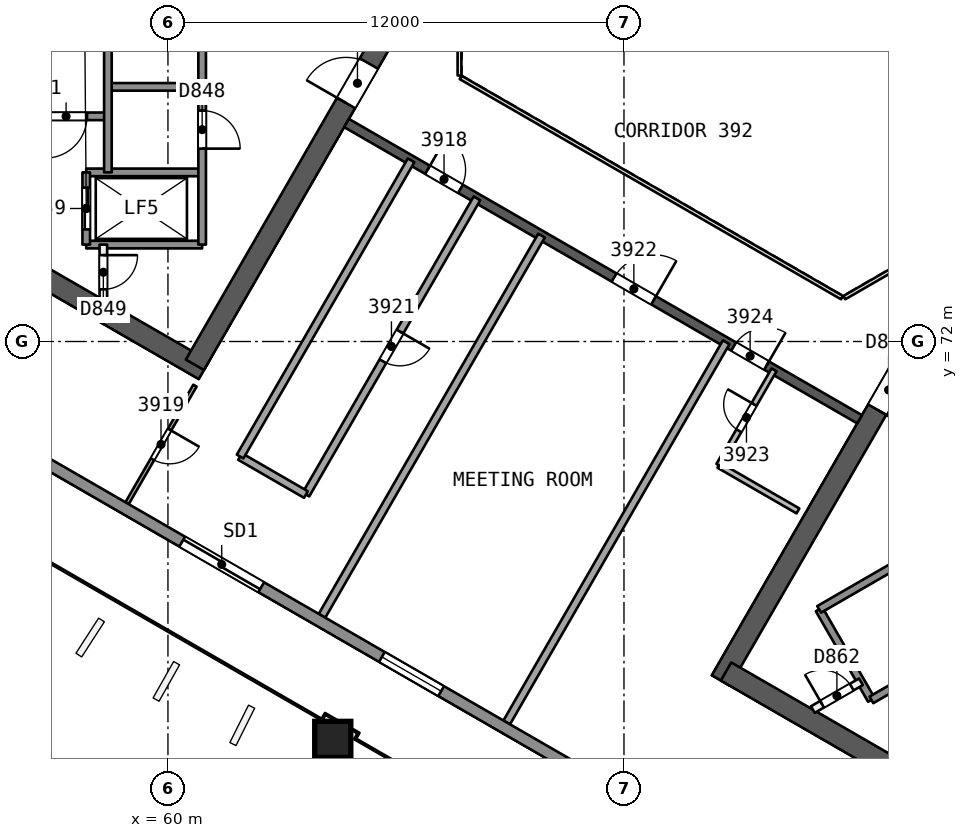
"""IFC4 building model, lengths in metres.
Left out: names, types, materials, properties, quantities, classifications, styles, units other than length and angle.
Written with IfcOpenShell. Run it as: python <this file> out.ifc"""

import sys

from ifc_helpers import new_model, si_unit, direction, frame, frame_2d, origin, origin_2d, place, context, subcontext, project, spatial, rectangle, extrude, element, fill, save


model = new_model("IFC4")
c1 = context("Model", 3, precision=1e-05, world=origin(), true_north=direction((0.0, 1.0)))
c2 = subcontext(c1, "Body", "Model", "MODEL_VIEW")
j1 = project(units=[si_unit("LENGTHUNIT", "METRE"), si_unit("PLANEANGLEUNIT", "RADIAN")], contexts=[c1])
p1 = place(None, origin())
s1 = spatial("IfcSite", under=j1, at=p1, CompositionType="ELEMENT")
p2 = place(p1, origin())
s2 = spatial("IfcBuilding", under=s1, at=p2, CompositionType="ELEMENT")
p3 = place(p2, frame((0.0, 0.0, 163.7)))
s3 = spatial("IfcBuildingStorey", under=s2, at=p3, CompositionType="ELEMENT", Elevation=163.7)
p4 = place(p3, frame((48.672, 78.336, 0.0), z_axis=(0.0, 0.0, 1.0), x_axis=(0.866023530946, -0.500003243837, 0.0)))
e1 = element("IfcWall", 1, at=p4, inside=s3, PredefinedType="SHEAR", context=c2, shape_type="SweptSolid", body=[
    extrude(rectangle(XDim=14.175, YDim=0.55, at=frame_2d((7.087, 0.0))), origin(), (0.0, 0.0, 1.0), 3.7),
])
p5 = place(p3, frame((60.709, 71.386, 0.0), z_axis=(0.0, 0.0, 1.0), x_axis=(0.500015938302, 0.866016201606, 0.0)))
e2 = element("IfcWall", 2, at=p5, inside=s3, PredefinedType="SHEAR", context=c2, shape_type="SweptSolid", body=[
    extrude(rectangle(XDim=10.105, YDim=0.55, at=frame_2d((5.053, 0.0))), origin(), (0.0, 0.0, 1.0), 3.7),
])
p6 = place(p5, frame((7.955, 0.0, 0.0)))
e3 = element("IfcOpeningElement", 3, at=p6, cuts=e2, PredefinedType="OPENING", context=c2, shape_type="SweptSolid", body=[
    extrude(rectangle(XDim=1.2, YDim=2.1, at=frame_2d((0.6, 1.05))), frame((0.0, 0.286, 0.0), z_axis=(0.0, -1.0, 0.0), x_axis=(1.0, 0.0, 0.0)), (0.0, 0.0, 1.0), 0.571),
])
p7 = place(p3, frame((79.659, 71.931, 0.0), z_axis=(0.0, 0.0, 1.0), x_axis=(-0.500000202252, -0.866025287014, 0.0)))
e4 = element("IfcWall", 4, at=p7, inside=s3, PredefinedType="SHEAR", context=c2, shape_type="SweptSolid", body=[
    extrude(rectangle(XDim=10.221, YDim=0.55, at=frame_2d((5.111, 0.0))), origin(), (0.0, 0.0, 1.0), 3.7),
])
p8 = place(p7, frame((0.791, 0.0, 0.0)))
e5 = element("IfcOpeningElement", 5, at=p8, cuts=e4, PredefinedType="OPENING", context=c2, shape_type="SweptSolid", body=[
    extrude(rectangle(XDim=1.2, YDim=2.1, at=frame_2d((0.6, 1.05))), frame((0.0, 0.286, 0.0), z_axis=(0.0, -1.0, 0.0), x_axis=(1.0, 0.0, 0.0)), (0.0, 0.0, 1.0), 0.571),
])
p9 = place(p3, frame((74.686, 63.317, 0.0), z_axis=(0.0, 0.0, 1.0), x_axis=(0.866024505738, -0.500001555459, 0.0)))
e6 = element("IfcWall", 6, at=p9, inside=s3, PredefinedType="SHEAR", context=c2, shape_type="SweptSolid", body=[
    extrude(rectangle(XDim=14.059, YDim=0.55, at=frame_2d((7.029, 0.0))), origin(), (0.0, 0.0, 1.0), 3.7),
])
p10 = place(p3, frame((64.7, 77.748, 0.0), z_axis=(0.0, 0.0, 1.0), x_axis=(0.866026492143, -0.499998114903, 0.0)))
e7 = element("IfcWall", 7, at=p10, inside=s3, PredefinedType="SHEAR", context=c2, shape_type="SweptSolid", body=[
    extrude(rectangle(XDim=15.588, YDim=0.25, at=frame_2d((7.794, 0.0))), origin(), (0.0, 0.0, 1.0), 3.25),
])
p11 = place(p10, frame((2.462, 0.0, 0.0)))
e8 = element("IfcOpeningElement", 8, at=p11, cuts=e7, PredefinedType="OPENING", context=c2, shape_type="SweptSolid", body=[
    extrude(rectangle(XDim=1.0, YDim=2.1, at=frame_2d((0.5, 1.05))), frame((0.0, 0.135, 0.0), z_axis=(0.0, -1.0, 0.0), x_axis=(1.0, 0.0, 0.0)), (0.0, 0.0, 1.0), 0.271),
])
p12 = place(p10, frame((8.129, 0.0, 0.0)))
e9 = element("IfcOpeningElement", 9, at=p12, cuts=e7, PredefinedType="OPENING", context=c2, shape_type="SweptSolid", body=[
    extrude(rectangle(XDim=1.2, YDim=2.4, at=frame_2d((0.6, 1.2))), frame((0.0, 0.135, 0.0), z_axis=(0.0, -1.0, 0.0), x_axis=(1.0, 0.0, 0.0)), (0.0, 0.0, 1.0), 0.271),
])
p13 = place(p10, frame((11.762, 0.0, 0.0)))
e10 = element("IfcOpeningElement", 10, at=p13, cuts=e7, PredefinedType="OPENING", context=c2, shape_type="SweptSolid", body=[
    extrude(rectangle(XDim=1.0, YDim=2.1, at=frame_2d((0.5, 1.05))), frame((0.0, 0.135, 0.0), z_axis=(0.0, -1.0, 0.0), x_axis=(1.0, 0.0, 0.0)), (0.0, 0.0, 1.0), 0.271),
])
p14 = place(p3, frame((64.325, 61.51, 0.0), z_axis=(0.010093620709, 0.017482414954, 0.999796221231), x_axis=(-0.499907122366, -0.865843723195, 0.020187025824)))
e11 = element("IfcColumn", 11, at=p14, inside=s3, PredefinedType="COLUMN", context=c2, shape_type="SweptSolid", body=[
    extrude(rectangle(XDim=0.95, YDim=0.95, at=origin_2d()), origin(), (0.0, 0.0, 1.0), 3.701),
])
p15 = place(p3, frame((60.71, 70.838, 0.0), z_axis=(0.0, 0.0, 1.0), x_axis=(-0.4999827131, -0.866035384151, 0.0)))
e12 = element("IfcWall", 12, at=p15, inside=s3, PredefinedType="PARTITIONING", context=c2, shape_type="SweptSolid", body=[
    extrude(rectangle(XDim=3.573, YDim=0.1, at=frame_2d((1.787, 0.0))), origin(), (0.0, 0.0, 1.0), 3.25),
])
p16 = place(p15, frame((1.336, 0.0, 0.0)))
e13 = element("IfcOpeningElement", 13, at=p16, cuts=e12, PredefinedType="OPENING", context=c2, shape_type="SweptSolid", body=[
    extrude(rectangle(XDim=0.9, YDim=2.1, at=frame_2d((0.45, 1.05))), frame((0.0, 0.061, 0.0), z_axis=(0.0, -1.0, 0.0), x_axis=(1.0, 0.0, 0.0)), (0.0, 0.0, 1.0), 0.121),
])
p17 = place(p3, frame((68.131, 75.767, 0.0), z_axis=(0.0, 0.0, 1.0), x_axis=(-0.5000018851, -0.866024315419, 0.0)))
e14 = element("IfcWall", 14, at=p17, inside=s3, PredefinedType="PARTITIONING", context=c2, shape_type="SweptSolid", body=[
    extrude(rectangle(XDim=9.0, YDim=0.2, at=frame_2d((4.5, 0.0))), origin(), (0.0, 0.0, 1.0), 3.25),
])
p18 = place(p17, frame((4.05, 0.0, 0.0)))
e15 = element("IfcOpeningElement", 15, at=p18, cuts=e14, PredefinedType="OPENING", context=c2, shape_type="SweptSolid", body=[
    extrude(rectangle(XDim=0.9, YDim=2.1, at=frame_2d((0.45, 1.05))), frame((0.0, 0.11, 0.0), z_axis=(0.0, -1.0, 0.0), x_axis=(1.0, 0.0, 0.0)), (0.0, 0.0, 1.0), 0.221),
])
p19 = place(p3, frame((63.631, 67.973, 0.0), z_axis=(0.0, 0.0, 1.0), x_axis=(-0.866041268327, 0.499972520799, 0.0)))
e16 = element("IfcWall", 16, at=p19, inside=s3, PredefinedType="PARTITIONING", context=c2, shape_type="SweptSolid", body=[
    extrude(rectangle(XDim=2.0, YDim=0.2, at=frame_2d((1.0, 0.0))), origin(), (0.0, 0.0, 1.0), 3.25),
])
p20 = place(p3, frame((61.899, 68.973, 0.0), z_axis=(0.0, 0.0, 1.0), x_axis=(0.5000018851, 0.866024315419, 0.0)))
e17 = element("IfcWall", 17, at=p20, inside=s3, PredefinedType="PARTITIONING", context=c2, shape_type="SweptSolid", body=[
    extrude(rectangle(XDim=9.0, YDim=0.2, at=frame_2d((4.5, 0.0))), origin(), (0.0, 0.0, 1.0), 3.25),
])
for number, where, z_axis, x_axis in (
    (18, (64.054, 64.782, 0.0), (0.0, 0.0, 1.0), (0.5, 0.866, 0.0)),
    (19, (68.914, 61.977, 0.0), (0.0, 0.0, 1.0), (0.5, 0.866, 0.0)),
):
    element("IfcWall", number, at=place(p3, frame(where, z_axis=z_axis, x_axis=x_axis)), inside=s3, PredefinedType="PARTITIONING", context=c2, shape_type="SweptSolid", body=[
        extrude(rectangle(XDim=11.552, YDim=0.2, at=frame_2d((5.776, 0.0))), origin(), (0.0, 0.0, 1.0), 3.25),
    ])
p21 = place(p3, frame((76.578, 67.542, 0.0), z_axis=(0.0, 0.0, 1.0), x_axis=(-0.866038271014, 0.499977712642, 0.0)))
e20 = element("IfcWall", 20, at=p21, inside=s3, PredefinedType="PARTITIONING", context=c2, shape_type="SweptSolid", body=[
    extrude(rectangle(XDim=2.401, YDim=0.15, at=frame_2d((1.2, 0.0))), origin(), (0.0, 0.0, 1.0), 3.25),
])
p22 = place(p3, frame((74.498, 68.743, 0.0), z_axis=(0.0, 0.0, 1.0), x_axis=(0.499987231761, 0.866032775405, 0.0)))
e21 = element("IfcWall", 21, at=p22, inside=s3, PredefinedType="PARTITIONING", context=c2, shape_type="SweptSolid", body=[
    extrude(rectangle(XDim=2.9, YDim=0.15, at=frame_2d((1.45, 0.0))), origin(), (0.0, 0.0, 1.0), 3.25),
])
p23 = place(p22, frame((1.05, 0.0, 0.0)))
e22 = element("IfcOpeningElement", 22, at=p23, cuts=e21, PredefinedType="OPENING", context=c2, shape_type="SweptSolid", body=[
    extrude(rectangle(XDim=0.8, YDim=2.1, at=frame_2d((0.4, 1.05))), frame((0.0, 0.085, 0.0), z_axis=(0.0, -1.0, 0.0), x_axis=(1.0, 0.0, 0.0)), (0.0, 0.0, 1.0), 0.171),
])
p24 = place(p3, frame((89.01, 50.202, 0.0), z_axis=(0.0, 0.0, 1.0), x_axis=(-0.866025862562, 0.499999205373, 0.0)))
e23 = element("IfcWall", 23, at=p24, inside=s3, PredefinedType="SOLIDWALL", context=c2, shape_type="SweptSolid", body=[
    extrude(rectangle(XDim=54.064, YDim=0.3, at=frame_2d((27.032, 0.0))), origin(), (0.0, 0.0, 1.0), 3.25),
])
p25 = place(p24, frame((30.665, 0.0, 0.0)))
e24 = element("IfcOpeningElement", 24, at=p25, cuts=e23, PredefinedType="OPENING", context=c2, shape_type="SweptSolid", body=[
    extrude(rectangle(XDim=2.4, YDim=2.4, at=frame_2d((1.2, 1.2))), frame((0.0, 0.161, 0.0), z_axis=(0.0, -1.0, 0.0), x_axis=(1.0, 0.0, 0.0)), (0.0, 0.0, 1.0), 0.321),
])
p26 = place(p24, frame((42.011, 0.0, 0.0)))
e25 = element("IfcOpeningElement", 25, at=p26, cuts=e23, PredefinedType="OPENING", context=c2, shape_type="SweptSolid", body=[
    extrude(rectangle(XDim=2.4, YDim=2.4, at=frame_2d((1.2, 1.2))), frame((0.0, 0.161, 0.0), z_axis=(0.0, -1.0, 0.0), x_axis=(1.0, 0.0, 0.0)), (0.0, 0.0, 1.0), 0.321),
])
p27 = place(p24, frame((10.402, 0.0, 0.0)))
e26 = element("IfcOpeningElement", 26, at=p27, cuts=e23, PredefinedType="OPENING", context=c2, shape_type="SweptSolid", body=[
    extrude(rectangle(XDim=2.4, YDim=2.4, at=frame_2d((1.2, 1.2))), frame((0.0, 0.161, 0.0), z_axis=(0.0, -1.0, 0.0), x_axis=(1.0, 0.0, 0.0)), (0.0, 0.0, 1.0), 0.321),
])
p28 = place(p24, frame((25.197, 0.0, 0.9)))
e27 = element("IfcOpeningElement", 27, at=p28, cuts=e23, PredefinedType="OPENING", context=c2, shape_type="SweptSolid", body=[
    extrude(rectangle(XDim=1.8, YDim=1.5, at=frame_2d((0.9, 0.75))), frame((0.0, 0.161, 0.0), z_axis=(0.0, -1.0, 0.0), x_axis=(1.0, 0.0, 0.0)), (0.0, 0.0, 1.0), 0.321),
])
p29 = place(p3, frame((60.9, 78.7, 0.0), z_axis=(0.0, 0.0, 1.0), x_axis=(-1.0, 0.0, 0.0)))
e28 = element("IfcWall", 28, at=p29, inside=s3, PredefinedType="SOLIDWALL", context=c2, shape_type="SweptSolid", body=[
    extrude(rectangle(XDim=2.48, YDim=0.2, at=frame_2d((1.24, 0.0))), origin(), (0.0, 0.0, 1.0), 3.25),
])
p30 = place(p3, frame((58.42, 77.925, 0.0), z_axis=(0.0, 0.0, 1.0), x_axis=(-1.0, 0.0, 0.0)))
e29 = element("IfcWall", 29, at=p30, inside=s3, PredefinedType="SOLIDWALL", context=c2, shape_type="SweptSolid", body=[
    extrude(rectangle(XDim=7.7, YDim=0.2, at=frame_2d((3.85, 0.0))), origin(), (0.0, 0.0, 1.0), 3.25),
])
p31 = place(p30, frame((0.55, 0.0, 0.0)))
e30 = element("IfcOpeningElement", 30, at=p31, cuts=e29, PredefinedType="OPENING", context=c2, shape_type="SweptSolid", body=[
    extrude(rectangle(XDim=1.1, YDim=2.1, at=frame_2d((0.55, 1.05))), frame((0.0, 0.11, 0.0), z_axis=(0.0, -1.0, 0.0), x_axis=(1.0, 0.0, 0.0)), (0.0, 0.0, 1.0), 0.221),
])
for number, where, z_axis, x_axis in (
    (31, (60.9, 76.45, 0.0), (0.0, 0.0, 1.0), (-1.0, 0.0, 0.0)),
    (32, (60.9, 74.55, 0.0), (0.0, 0.0, 1.0), (-1.0, 0.0, 0.0)),
):
    element("IfcWall", number, at=place(p3, frame(where, z_axis=z_axis, x_axis=x_axis)), inside=s3, PredefinedType="SOLIDWALL", context=c2, shape_type="SweptSolid", body=[
        extrude(rectangle(XDim=3.05, YDim=0.2, at=frame_2d((1.525, 0.0))), origin(), (0.0, 0.0, 1.0), 3.25),
    ])
p32 = place(p3, frame((60.9, 85.45, 0.0), z_axis=(0.0, 0.0, 1.0), x_axis=(0.0, -1.0, 0.0)))
e33 = element("IfcWall", 33, at=p32, inside=s3, PredefinedType="SOLIDWALL", context=c2, shape_type="SweptSolid", body=[
    extrude(rectangle(XDim=10.9, YDim=0.2, at=frame_2d((5.45, 0.0))), origin(), (0.0, 0.0, 1.0), 3.25),
])
p33 = place(p32, frame((2.875, 0.0, 0.0)))
e34 = element("IfcOpeningElement", 34, at=p33, cuts=e33, PredefinedType="OPENING", context=c2, shape_type="SweptSolid", body=[
    extrude(rectangle(XDim=1.0, YDim=2.1, at=frame_2d((0.5, 1.05))), frame((0.0, 0.11, 0.0), z_axis=(0.0, -1.0, 0.0), x_axis=(1.0, 0.0, 0.0)), (0.0, 0.0, 1.0), 0.221),
])
p34 = place(p32, frame((7.375, 0.0, 0.0)))
e35 = element("IfcOpeningElement", 35, at=p34, cuts=e33, PredefinedType="OPENING", context=c2, shape_type="SweptSolid", body=[
    extrude(rectangle(XDim=1.0, YDim=2.1, at=frame_2d((0.5, 1.05))), frame((0.0, 0.11, 0.0), z_axis=(0.0, -1.0, 0.0), x_axis=(1.0, 0.0, 0.0)), (0.0, 0.0, 1.0), 0.221),
])
p35 = place(p3, frame((58.42, 86.974, 0.0), z_axis=(0.0, 0.0, 1.0), x_axis=(0.0, -1.0, 0.0)))
e36 = element("IfcWall", 36, at=p35, inside=s3, PredefinedType="SOLIDWALL", context=c2, shape_type="SweptSolid", body=[
    extrude(rectangle(XDim=10.524, YDim=0.2, at=frame_2d((5.262, 0.0))), origin(), (0.0, 0.0, 1.0), 3.25),
])
p36 = place(p35, frame((0.312, 0.0, 0.0)))
e37 = element("IfcOpeningElement", 37, at=p36, cuts=e36, PredefinedType="OPENING", context=c2, shape_type="SweptSolid", body=[
    extrude(rectangle(XDim=0.9, YDim=2.1, at=frame_2d((0.45, 1.05))), frame((0.0, 0.11, 0.0), z_axis=(0.0, -1.0, 0.0), x_axis=(1.0, 0.0, 0.0)), (0.0, 0.0, 1.0), 0.221),
])
p37 = place(p3, frame((58.3, 74.55, 0.0), z_axis=(0.0, 0.0, 1.0), x_axis=(0.0, -1.0, 0.0)))
e38 = element("IfcWall", 38, at=p37, inside=s3, PredefinedType="PARTITIONING", context=c2, shape_type="SweptSolid", body=[
    extrude(rectangle(XDim=1.455, YDim=0.2, at=frame_2d((0.728, 0.0))), origin(), (0.0, 0.0, 1.0), 3.25),
])
p38 = place(p37, frame((0.278, 0.0, 0.0)))
e39 = element("IfcOpeningElement", 39, at=p38, cuts=e38, PredefinedType="OPENING", context=c2, shape_type="SweptSolid", body=[
    extrude(rectangle(XDim=0.9, YDim=2.1, at=frame_2d((0.45, 1.05))), frame((0.0, 0.11, 0.0), z_axis=(0.0, -1.0, 0.0), x_axis=(1.0, 0.0, 0.0)), (0.0, 0.0, 1.0), 0.221),
])
p39 = place(p3, frame((57.85, 76.45, 0.0), z_axis=(0.0, 0.0, 1.0), x_axis=(0.0, -1.0, 0.0)))
e40 = element("IfcWall", 40, at=p39, inside=s3, PredefinedType="SOLIDWALL", context=c2, shape_type="SweptSolid", body=[
    extrude(rectangle(XDim=1.9, YDim=0.2, at=frame_2d((0.95, 0.0))), origin(), (0.0, 0.0, 1.0), 3.25),
])
p40 = place(p39, frame((0.4, 0.0, 0.0)))
e41 = element("IfcOpeningElement", 41, at=p40, cuts=e40, PredefinedType="OPENING", context=c2, shape_type="SweptSolid", body=[
    extrude(rectangle(XDim=1.1, YDim=2.1, at=frame_2d((0.55, 1.05))), frame((0.0, 0.11, 0.0), z_axis=(0.0, -1.0, 0.0), x_axis=(1.0, 0.0, 0.0)), (0.0, 0.0, 1.0), 0.221),
])
p41 = place(p3, frame((77.135, 64.952, 0.0), z_axis=(0.0, 0.0, 1.0), x_axis=(0.499996545922, -0.866027397988, 0.0)))
e42 = element("IfcWall", 42, at=p41, inside=s3, PredefinedType="SOLIDWALL", context=c2, shape_type="SweptSolid", body=[
    extrude(rectangle(XDim=2.75, YDim=0.2, at=frame_2d((1.375, 0.0))), origin(), (0.0, 0.0, 1.0), 3.25),
])
p42 = place(p3, frame((77.135, 64.952, 0.0), z_axis=(0.0, 0.0, 1.0), x_axis=(0.866031916153, 0.499988720078, 0.0)))
e43 = element("IfcWall", 43, at=p42, inside=s3, PredefinedType="SOLIDWALL", context=c2, shape_type="SweptSolid", body=[
    extrude(rectangle(XDim=11.35, YDim=0.2, at=frame_2d((5.675, 0.0))), origin(), (0.0, 0.0, 1.0), 3.25),
])
p43 = place(p3, frame((76.97, 62.316, 0.0), z_axis=(0.0, 0.0, 1.0), x_axis=(0.865982457891, 0.500074377092, 0.0)))
e44 = element("IfcWall", 44, at=p43, inside=s3, PredefinedType="PARTITIONING", context=c2, shape_type="SweptSolid", body=[
    extrude(rectangle(XDim=1.461, YDim=0.2, at=frame_2d((0.73, 0.0))), origin(), (0.0, 0.0, 1.0), 3.25),
])
p44 = place(p43, frame((0.281, 0.0, 0.0)))
e45 = element("IfcOpeningElement", 45, at=p44, cuts=e44, PredefinedType="OPENING", context=c2, shape_type="SweptSolid", body=[
    extrude(rectangle(XDim=0.9, YDim=2.1, at=frame_2d((0.45, 1.05))), frame((0.0, 0.11, 0.0), z_axis=(0.0, -1.0, 0.0), x_axis=(1.0, 0.0, 0.0)), (0.0, 0.0, 1.0), 0.221),
])
p45 = place(p3, frame((78.51, 62.57, 0.0), z_axis=(0.0, 0.0, 1.0), x_axis=(0.866053019151, 0.499952165731, 0.0)))
e46 = element("IfcWall", 46, at=p45, inside=s3, PredefinedType="SOLIDWALL", context=c2, shape_type="SweptSolid", body=[
    extrude(rectangle(XDim=2.3, YDim=0.2, at=frame_2d((1.15, 0.0))), origin(), (0.0, 0.0, 1.0), 3.25),
])
p46 = place(p3, frame((67.672, 81.0, 0.0), z_axis=(0.0, 0.0, 1.0), x_axis=(0.0, -1.0, 0.0)))
e47 = element("IfcWall", 47, at=p46, inside=s3, PredefinedType="PARTITIONING", context=c2, shape_type="SweptSolid", body=[
    extrude(rectangle(XDim=2.0, YDim=0.1, at=frame_2d((1.0, 0.0))), origin(), (0.0, 0.0, 1.0), 3.25),
])
p47 = place(p3, frame((67.702, 78.948, 0.0), z_axis=(0.0, 0.0, 1.0), x_axis=(0.866026658274, -0.499997827154, 0.0)))
e48 = element("IfcWall", 48, at=p47, inside=s3, PredefinedType="PARTITIONING", context=c2, shape_type="SweptSolid", body=[
    extrude(rectangle(XDim=11.588, YDim=0.1, at=frame_2d((5.794, 0.0))), origin(), (0.0, 0.0, 1.0), 3.25),
])
p48 = place(p3, frame((77.798, 73.154, 0.0), z_axis=(0.0, 0.0, 1.0), x_axis=(0.866041268327, 0.499972520799, 0.0)))
e49 = element("IfcWall", 49, at=p48, inside=s3, PredefinedType="PARTITIONING", context=c2, shape_type="SweptSolid", body=[
    extrude(rectangle(XDim=2.0, YDim=0.1, at=frame_2d((1.0, 0.0))), origin(), (0.0, 0.0, 1.0), 3.25),
])
p49 = place(p11, origin())
e50 = element("IfcDoor", 50, at=p49, inside=s3, OperationType="SINGLE_SWING_LEFT", PredefinedType="NOTDEFINED", context=c2, shape_type="SweptSolid", body=[
    extrude(rectangle(XDim=1.0, YDim=2.1, at=frame_2d((0.5, 1.05))), frame((0.0, 0.025, 0.0), z_axis=(0.0, -1.0, 0.0), x_axis=(1.0, 0.0, 0.0)), (0.0, 0.0, 1.0), 0.05),
])
fill(e8, e50)
p50 = place(p16, origin())
e51 = element("IfcDoor", 51, at=p50, inside=s3, OperationType="SINGLE_SWING_LEFT", PredefinedType="NOTDEFINED", context=c2, shape_type="SweptSolid", body=[
    extrude(rectangle(XDim=0.9, YDim=2.1, at=frame_2d((0.45, 1.05))), frame((0.0, 0.025, 0.0), z_axis=(0.0, -1.0, 0.0), x_axis=(1.0, 0.0, 0.0)), (0.0, 0.0, 1.0), 0.05),
])
fill(e13, e51)
p51 = place(p18, origin())
e52 = element("IfcDoor", 52, at=p51, inside=s3, OperationType="SINGLE_SWING_LEFT", PredefinedType="NOTDEFINED", context=c2, shape_type="SweptSolid", body=[
    extrude(rectangle(XDim=0.9, YDim=2.1, at=frame_2d((0.45, 1.05))), frame((0.0, 0.025, 0.0), z_axis=(0.0, -1.0, 0.0), x_axis=(1.0, 0.0, 0.0)), (0.0, 0.0, 1.0), 0.05),
])
fill(e15, e52)
p52 = place(p12, origin())
e53 = element("IfcDoor", 53, at=p52, inside=s3, OperationType="SINGLE_SWING_RIGHT", PredefinedType="NOTDEFINED", context=c2, shape_type="SweptSolid", body=[
    extrude(rectangle(XDim=1.2, YDim=2.4, at=frame_2d((0.6, 1.2))), frame((0.0, 0.025, 0.0), z_axis=(0.0, -1.0, 0.0), x_axis=(1.0, 0.0, 0.0)), (0.0, 0.0, 1.0), 0.05),
])
fill(e9, e53)
p53 = place(p23, origin())
e54 = element("IfcDoor", 54, at=p53, inside=s3, OperationType="SINGLE_SWING_RIGHT", PredefinedType="NOTDEFINED", context=c2, shape_type="SweptSolid", body=[
    extrude(rectangle(XDim=0.8, YDim=2.1, at=frame_2d((0.4, 1.05))), frame((0.0, 0.025, 0.0), z_axis=(0.0, -1.0, 0.0), x_axis=(1.0, 0.0, 0.0)), (0.0, 0.0, 1.0), 0.05),
])
fill(e22, e54)
p54 = place(p13, origin())
e55 = element("IfcDoor", 55, at=p54, inside=s3, OperationType="SINGLE_SWING_RIGHT", PredefinedType="NOTDEFINED", context=c2, shape_type="SweptSolid", body=[
    extrude(rectangle(XDim=1.0, YDim=2.1, at=frame_2d((0.5, 1.05))), frame((0.0, 0.025, 0.0), z_axis=(0.0, -1.0, 0.0), x_axis=(1.0, 0.0, 0.0)), (0.0, 0.0, 1.0), 0.05),
])
fill(e10, e55)
p55 = place(p25, origin())
e56 = element("IfcDoor", 56, at=p55, inside=s3, OperationType="SLIDING_TO_LEFT", PredefinedType="NOTDEFINED", context=c2, shape_type="SweptSolid", body=[
    extrude(rectangle(XDim=2.4, YDim=2.4, at=frame_2d((1.2, 1.2))), frame((0.0, 0.025, 0.0), z_axis=(0.0, -1.0, 0.0), x_axis=(1.0, 0.0, 0.0)), (0.0, 0.0, 1.0), 0.05),
])
fill(e24, e56)
p56 = place(p28, origin())
e57 = element("IfcWindow", 57, at=p56, inside=s3, PartitioningType="SINGLE_PANEL", PredefinedType="WINDOW", context=c2, shape_type="SweptSolid", body=[
    extrude(rectangle(XDim=1.8, YDim=1.5, at=frame_2d((0.9, 0.75))), frame((0.0, 0.03, 0.0), z_axis=(0.0, -1.0, 0.0), x_axis=(1.0, 0.0, 0.0)), (0.0, 0.0, 1.0), 0.06),
])
fill(e27, e57)
p57 = place(p6, origin())
e58 = element("IfcDoor", 58, at=p57, inside=s3, OperationType="SINGLE_SWING_LEFT", PredefinedType="NOTDEFINED", context=c2, shape_type="SweptSolid", body=[
    extrude(rectangle(XDim=1.2, YDim=2.1, at=frame_2d((0.6, 1.05))), frame((0.0, 0.025, 0.0), z_axis=(0.0, -1.0, 0.0), x_axis=(1.0, 0.0, 0.0)), (0.0, 0.0, 1.0), 0.05),
])
fill(e3, e58)
p58 = place(p40, origin())
e59 = element("IfcDoor", 59, at=p58, inside=s3, OperationType="SLIDING_TO_RIGHT", PredefinedType="NOTDEFINED", context=c2, shape_type="SweptSolid", body=[
    extrude(rectangle(XDim=1.1, YDim=2.1, at=frame_2d((0.55, 1.05))), frame((0.0, 0.025, 0.0), z_axis=(0.0, -1.0, 0.0), x_axis=(1.0, 0.0, 0.0)), (0.0, 0.0, 1.0), 0.05),
])
fill(e41, e59)
p59 = place(p34, origin())
e60 = element("IfcDoor", 60, at=p59, inside=s3, OperationType="SINGLE_SWING_RIGHT", PredefinedType="NOTDEFINED", context=c2, shape_type="SweptSolid", body=[
    extrude(rectangle(XDim=1.0, YDim=2.1, at=frame_2d((0.5, 1.05))), frame((0.0, 0.025, 0.0), z_axis=(0.0, -1.0, 0.0), x_axis=(1.0, 0.0, 0.0)), (0.0, 0.0, 1.0), 0.05),
])
fill(e35, e60)
p60 = place(p38, origin())
e61 = element("IfcDoor", 61, at=p60, inside=s3, OperationType="SINGLE_SWING_LEFT", PredefinedType="NOTDEFINED", context=c2, shape_type="SweptSolid", body=[
    extrude(rectangle(XDim=0.9, YDim=2.1, at=frame_2d((0.45, 1.05))), frame((0.0, 0.025, 0.0), z_axis=(0.0, -1.0, 0.0), x_axis=(1.0, 0.0, 0.0)), (0.0, 0.0, 1.0), 0.05),
])
fill(e39, e61)
p61 = place(p31, origin())
e62 = element("IfcDoor", 62, at=p61, inside=s3, OperationType="SINGLE_SWING_RIGHT", PredefinedType="NOTDEFINED", context=c2, shape_type="SweptSolid", body=[
    extrude(rectangle(XDim=1.1, YDim=2.1, at=frame_2d((0.55, 1.05))), frame((0.0, 0.025, 0.0), z_axis=(0.0, -1.0, 0.0), x_axis=(1.0, 0.0, 0.0)), (0.0, 0.0, 1.0), 0.05),
])
fill(e30, e62)
p62 = place(p8, origin())
e63 = element("IfcDoor", 63, at=p62, inside=s3, OperationType="SINGLE_SWING_RIGHT", PredefinedType="NOTDEFINED", context=c2, shape_type="SweptSolid", body=[
    extrude(rectangle(XDim=1.2, YDim=2.1, at=frame_2d((0.6, 1.05))), frame((0.0, 0.025, 0.0), z_axis=(0.0, -1.0, 0.0), x_axis=(1.0, 0.0, 0.0)), (0.0, 0.0, 1.0), 0.05),
])
fill(e5, e63)
p63 = place(p44, origin())
e64 = element("IfcDoor", 64, at=p63, inside=s3, OperationType="SINGLE_SWING_LEFT", PredefinedType="NOTDEFINED", context=c2, shape_type="SweptSolid", body=[
    extrude(rectangle(XDim=0.9, YDim=2.1, at=frame_2d((0.45, 1.05))), frame((0.0, 0.025, 0.0), z_axis=(0.0, -1.0, 0.0), x_axis=(1.0, 0.0, 0.0)), (0.0, 0.0, 1.0), 0.05),
])
fill(e45, e64)
save(model, sys.argv[1])
